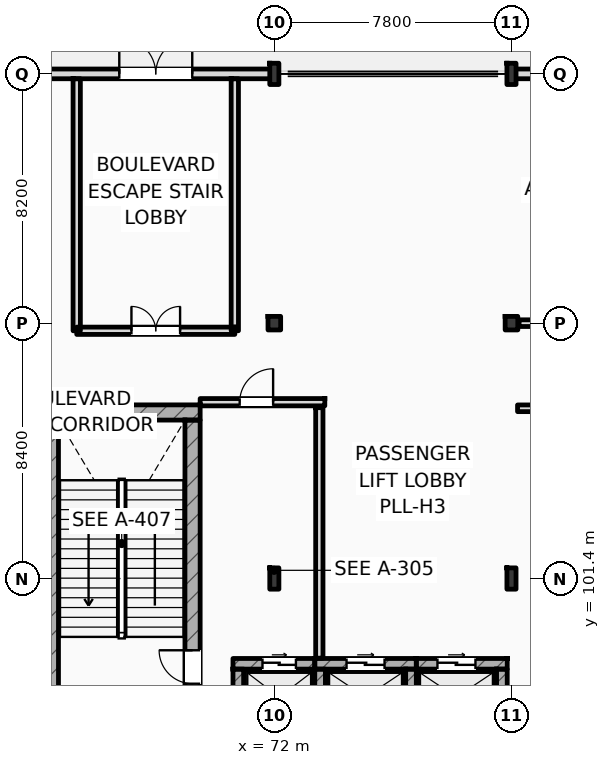
"""IFC4 building model, lengths in metres.
Left out: names, types, materials, properties, quantities, classifications, styles, units other than length and angle.
Written with IfcOpenShell. Run it as: python <this file> out.ifc"""

import sys

from ifc_helpers import new_model, si_unit, direction, frame, frame_2d, origin, origin_2d, place, context, subcontext, project, spatial, rectangle, i_section, extrude, element, fill, save


model = new_model("IFC4")
c1 = context("Model", 3, precision=1e-05, world=origin(), true_north=direction((0.0, 1.0)))
c2 = subcontext(c1, "Body", "Model", "MODEL_VIEW")
j1 = project(units=[si_unit("LENGTHUNIT", "METRE"), si_unit("PLANEANGLEUNIT", "RADIAN")], contexts=[c1])
p1 = place(None, origin())
s1 = spatial("IfcSite", under=j1, at=p1, CompositionType="ELEMENT")
p2 = place(p1, origin())
s2 = spatial("IfcBuilding", under=s1, at=p2, CompositionType="ELEMENT")
p3 = place(p2, origin())
s3 = spatial("IfcBuildingStorey", under=s2, at=p3, CompositionType="ELEMENT", Elevation=0.0)
p4 = place(p3, frame((72.0, 101.4, 0.0), z_axis=(0.0, 0.0, 1.0), x_axis=(1.0, 0.0, 0.0)))
e1 = element("IfcColumn", 1, at=p4, inside=s3, PredefinedType="COLUMN", context=c2, shape_type="SweptSolid", body=[
    extrude(i_section(OverallWidth=0.3, OverallDepth=0.7, WebThickness=0.017, FlangeThickness=0.032, FilletRadius=0.027, at=origin_2d()), origin(), (0.0, 0.0, 1.0), 6.0),
])
p5 = place(p3, frame((72.0, 109.8, 0.0), z_axis=(0.0, 0.0, 1.0), x_axis=(1.0, 0.0, 0.0)))
e2 = element("IfcColumn", 2, at=p5, inside=s3, PredefinedType="COLUMN", context=c2, shape_type="SweptSolid", body=[
    extrude(i_section(OverallWidth=0.416, OverallDepth=0.446, WebThickness=0.036, FlangeThickness=0.048, FilletRadius=0.015, at=origin_2d()), origin(), (0.0, 0.0, 1.0), 6.0),
])
for number, where, z_axis, x_axis in (
    (3, (72.0, 118.0, 0.0), (0.0, 0.0, 1.0), (1.0, 0.0, 0.0)),
    (4, (79.8, 101.4, 0.0), (0.0, 0.0, 1.0), (1.0, 0.0, 0.0)),
):
    element("IfcColumn", number, at=place(p3, frame(where, z_axis=z_axis, x_axis=x_axis)), inside=s3, PredefinedType="COLUMN", context=c2, shape_type="SweptSolid", body=[
        extrude(i_section(OverallWidth=0.3, OverallDepth=0.7, WebThickness=0.017, FlangeThickness=0.032, FilletRadius=0.027, at=origin_2d()), origin(), (0.0, 0.0, 1.0), 6.0),
    ])
p6 = place(p3, frame((79.8, 109.8, 0.0), z_axis=(0.0, 0.0, 1.0), x_axis=(1.0, 0.0, 0.0)))
e5 = element("IfcColumn", 5, at=p6, inside=s3, PredefinedType="COLUMN", context=c2, shape_type="SweptSolid", body=[
    extrude(i_section(OverallWidth=0.416, OverallDepth=0.446, WebThickness=0.036, FlangeThickness=0.048, FilletRadius=0.015, at=origin_2d()), origin(), (0.0, 0.0, 1.0), 6.0),
])
p7 = place(p3, frame((79.8, 118.0, 0.0), z_axis=(0.0, 0.0, 1.0), x_axis=(1.0, 0.0, 0.0)))
e6 = element("IfcColumn", 6, at=p7, inside=s3, PredefinedType="COLUMN", context=c2, shape_type="SweptSolid", body=[
    extrude(i_section(OverallWidth=0.3, OverallDepth=0.7, WebThickness=0.017, FlangeThickness=0.032, FilletRadius=0.027, at=origin_2d()), origin(), (0.0, 0.0, 1.0), 6.0),
])
p8 = place(p3, frame((64.4, 106.862, 0.0), z_axis=(0.0, 0.0, 1.0), x_axis=(1.0, 0.0, 0.0)))
e7 = element("IfcWall", 7, at=p8, inside=s3, PredefinedType="SHEAR", context=c2, shape_type="SweptSolid", body=[
    extrude(rectangle(XDim=5.16, YDim=0.5, at=frame_2d((2.58, 0.0))), origin(), (0.0, 0.0, 1.0), 6.0),
])
p9 = place(p3, frame((64.65, 97.5, 0.0), z_axis=(0.0, 0.0, 1.0), x_axis=(0.0, 1.0, 0.0)))
e8 = element("IfcWall", 8, at=p9, inside=s3, PredefinedType="SHEAR", context=c2, shape_type="SweptSolid", body=[
    extrude(rectangle(XDim=9.112, YDim=0.5, at=frame_2d((4.556, 0.0))), origin(), (0.0, 0.0, 1.0), 6.0),
])
p10 = place(p3, frame((69.31, 97.5, 0.0), z_axis=(0.0, 0.0, 1.0), x_axis=(0.0, 1.0, 0.0)))
e9 = element("IfcWall", 9, at=p10, inside=s3, PredefinedType="SHEAR", context=c2, shape_type="SweptSolid", body=[
    extrude(rectangle(XDim=9.112, YDim=0.5, at=frame_2d((4.556, 0.0))), origin(), (0.0, 0.0, 1.0), 6.0),
])
p11 = place(p10, frame((0.44, 0.0, 0.0)))
e10 = element("IfcOpeningElement", 10, at=p11, cuts=e9, PredefinedType="OPENING", context=c2, shape_type="SweptSolid", body=[
    extrude(rectangle(XDim=1.1, YDim=2.2, at=frame_2d((0.55, 1.1))), frame((0.0, 0.26, 0.0), z_axis=(0.0, -1.0, 0.0), x_axis=(1.0, 0.0, 0.0)), (0.0, 0.0, 1.0), 0.52),
])
p12 = place(p3, frame((64.2, 118.0, 0.0), z_axis=(0.0, 0.0, 1.0), x_axis=(1.0, 0.0, 0.0)))
e11 = element("IfcWall", 11, at=p12, inside=s3, PredefinedType="STANDARD", context=c2, shape_type="SweptSolid", body=[
    extrude(rectangle(XDim=7.8, YDim=0.32, at=frame_2d((3.9, 0.0))), origin(), (0.0, 0.0, 1.0), 5.19),
])
p13 = place(p12, frame((2.7, 0.0, 0.0)))
e12 = element("IfcOpeningElement", 12, at=p13, cuts=e11, PredefinedType="OPENING", context=c2, shape_type="SweptSolid", body=[
    extrude(rectangle(XDim=2.4, YDim=2.6, at=frame_2d((1.2, 1.3))), frame((0.0, 0.17, 0.0), z_axis=(0.0, -1.0, 0.0), x_axis=(1.0, 0.0, 0.0)), (0.0, 0.0, 1.0), 0.34),
])
p14 = place(p3, frame((79.8, 118.0, 0.0), z_axis=(0.0, 0.0, 1.0), x_axis=(1.0, 0.0, 0.0)))
e13 = element("IfcWall", 13, at=p14, inside=s3, PredefinedType="STANDARD", context=c2, shape_type="SweptSolid", body=[
    extrude(rectangle(XDim=7.8, YDim=0.32, at=frame_2d((3.9, 0.0))), origin(), (0.0, 0.0, 1.0), 5.19),
])
p15 = place(p14, frame((2.7, 0.0, 0.0)))
e14 = element("IfcOpeningElement", 14, at=p15, cuts=e13, PredefinedType="OPENING", context=c2, shape_type="SweptSolid", body=[
    extrude(rectangle(XDim=2.4, YDim=2.6, at=frame_2d((1.2, 1.3))), frame((0.0, 0.17, 0.0), z_axis=(0.0, -1.0, 0.0), x_axis=(1.0, 0.0, 0.0)), (0.0, 0.0, 1.0), 0.34),
])
p16 = place(p3, frame((70.64, 98.595, 0.0), z_axis=(0.0, 0.0, 1.0), x_axis=(1.0, 0.0, 0.0)))
e15 = element("IfcWall", 15, at=p16, inside=s3, PredefinedType="SHEAR", context=c2, shape_type="SweptSolid", body=[
    extrude(rectangle(XDim=2.69, YDim=0.35, at=frame_2d((1.345, 0.0))), origin(), (0.0, 0.0, 1.0), 5.7),
])
p17 = place(p16, frame((0.97, 0.0, 0.0)))
e16 = element("IfcOpeningElement", 16, at=p17, cuts=e15, PredefinedType="OPENING", context=c2, shape_type="SweptSolid", body=[
    extrude(rectangle(XDim=1.1, YDim=2.2, at=frame_2d((0.55, 1.1))), frame((0.0, 0.185, 0.0), z_axis=(0.0, -1.0, 0.0), x_axis=(1.0, 0.0, 0.0)), (0.0, 0.0, 1.0), 0.37),
])
p18 = place(p3, frame((70.815, 96.58, 0.0), z_axis=(0.0, 0.0, 1.0), x_axis=(0.0, 1.0, 0.0)))
e17 = element("IfcWall", 17, at=p18, inside=s3, PredefinedType="SHEAR", context=c2, shape_type="SweptSolid", body=[
    extrude(rectangle(XDim=1.84, YDim=0.35, at=frame_2d((0.92, 0.0))), origin(), (0.0, 0.0, 1.0), 5.7),
])
p19 = place(p3, frame((73.33, 98.595, 0.0), z_axis=(0.0, 0.0, 1.0), x_axis=(1.0, 0.0, 0.0)))
e18 = element("IfcWall", 18, at=p19, inside=s3, PredefinedType="SHEAR", context=c2, shape_type="SweptSolid", body=[
    extrude(rectangle(XDim=3.34, YDim=0.35, at=frame_2d((1.67, 0.0))), origin(), (0.0, 0.0, 1.0), 5.7),
])
p20 = place(p19, frame((1.045, 0.0, 0.0)))
e19 = element("IfcOpeningElement", 19, at=p20, cuts=e18, PredefinedType="OPENING", context=c2, shape_type="SweptSolid", body=[
    extrude(rectangle(XDim=1.25, YDim=2.25, at=frame_2d((0.625, 1.125))), frame((0.0, 0.185, 0.0), z_axis=(0.0, -1.0, 0.0), x_axis=(1.0, 0.0, 0.0)), (0.0, 0.0, 1.0), 0.37),
])
for number, where, z_axis, x_axis in (
    (20, (73.505, 96.58, 0.0), (0.0, 0.0, 1.0), (0.0, 1.0, 0.0)),
    (21, (76.495, 96.58, 0.0), (0.0, 0.0, 1.0), (0.0, 1.0, 0.0)),
):
    element("IfcWall", number, at=place(p3, frame(where, z_axis=z_axis, x_axis=x_axis)), inside=s3, PredefinedType="SHEAR", context=c2, shape_type="SweptSolid", body=[
        extrude(rectangle(XDim=1.84, YDim=0.35, at=frame_2d((0.92, 0.0))), origin(), (0.0, 0.0, 1.0), 5.7),
    ])
p21 = place(p3, frame((76.67, 98.595, 0.0), z_axis=(0.0, 0.0, 1.0), x_axis=(1.0, 0.0, 0.0)))
e22 = element("IfcWall", 22, at=p21, inside=s3, PredefinedType="SHEAR", context=c2, shape_type="SweptSolid", body=[
    extrude(rectangle(XDim=2.99, YDim=0.35, at=frame_2d((1.495, 0.0))), origin(), (0.0, 0.0, 1.0), 5.7),
])
p22 = place(p21, frame((0.695, 0.0, 0.0)))
e23 = element("IfcOpeningElement", 23, at=p22, cuts=e22, PredefinedType="OPENING", context=c2, shape_type="SweptSolid", body=[
    extrude(rectangle(XDim=1.25, YDim=2.25, at=frame_2d((0.625, 1.125))), frame((0.0, 0.185, 0.0), z_axis=(0.0, -1.0, 0.0), x_axis=(1.0, 0.0, 0.0)), (0.0, 0.0, 1.0), 0.37),
])
p23 = place(p3, frame((79.485, 96.58, 0.0), z_axis=(0.0, 0.0, 1.0), x_axis=(0.0, 1.0, 0.0)))
e24 = element("IfcWall", 24, at=p23, inside=s3, PredefinedType="SHEAR", context=c2, shape_type="SweptSolid", body=[
    extrude(rectangle(XDim=1.84, YDim=0.35, at=frame_2d((0.92, 0.0))), origin(), (0.0, 0.0, 1.0), 5.24),
])
p24 = place(p3, frame((73.48, 98.78, 0.0), z_axis=(0.0, 0.0, 1.0), x_axis=(0.0, 1.0, 0.0)))
e25 = element("IfcWall", 25, at=p24, inside=s3, PredefinedType="STANDARD", context=c2, shape_type="SweptSolid", body=[
    extrude(rectangle(XDim=8.24, YDim=0.24, at=frame_2d((4.12, 0.0))), origin(), (0.0, 0.0, 1.0), 5.7),
])
p25 = place(p3, frame((69.56, 107.2, 0.0), z_axis=(0.0, 0.0, 1.0), x_axis=(1.0, 0.0, 0.0)))
e26 = element("IfcWall", 26, at=p25, inside=s3, PredefinedType="STANDARD", context=c2, shape_type="SweptSolid", body=[
    extrude(rectangle(XDim=4.1, YDim=0.24, at=frame_2d((2.05, 0.0))), origin(), (0.0, 0.0, 1.0), 5.7),
])
p26 = place(p25, frame((1.3, 0.0, 0.0)))
e27 = element("IfcOpeningElement", 27, at=p26, cuts=e26, PredefinedType="OPENING", context=c2, shape_type="SweptSolid", body=[
    extrude(rectangle(XDim=1.1, YDim=2.2, at=frame_2d((0.55, 1.1))), frame((0.0, 0.13, 0.0), z_axis=(0.0, -1.0, 0.0), x_axis=(1.0, 0.0, 0.0)), (0.0, 0.0, 1.0), 0.26),
])
p27 = place(p3, frame((80.05, 109.8, 0.0), z_axis=(0.0, 0.0, 1.0), x_axis=(1.0, 0.0, 0.0)))
e28 = element("IfcWall", 28, at=p27, inside=s3, PredefinedType="PARTITIONING", context=c2, shape_type="SweptSolid", body=[
    extrude(rectangle(XDim=39.25, YDim=0.22, at=frame_2d((19.625, 0.0))), origin(), (0.0, 0.0, 1.0), 5.14),
])
p28 = place(p27, frame((18.625, 0.0, 0.0)))
e29 = element("IfcOpeningElement", 29, at=p28, cuts=e28, PredefinedType="OPENING", context=c2, shape_type="SweptSolid", body=[
    extrude(rectangle(XDim=2.0, YDim=2.35, at=frame_2d((1.0, 1.175))), frame((0.0, 0.12, 0.0), z_axis=(0.0, -1.0, 0.0), x_axis=(1.0, 0.0, 0.0)), (0.0, 0.0, 1.0), 0.24),
])
p29 = place(p3, frame((80.0, 107.0, 0.0), z_axis=(0.0, 0.0, 1.0), x_axis=(1.0, 0.0, 0.0)))
e30 = element("IfcWall", 30, at=p29, inside=s3, PredefinedType="PARTITIONING", context=c2, shape_type="SweptSolid", body=[
    extrude(rectangle(XDim=39.35, YDim=0.22, at=frame_2d((19.675, 0.0))), origin(), (0.0, 0.0, 1.0), 5.7),
])
p30 = place(p29, frame((18.675, 0.0, 0.0)))
e31 = element("IfcOpeningElement", 31, at=p30, cuts=e30, PredefinedType="OPENING", context=c2, shape_type="SweptSolid", body=[
    extrude(rectangle(XDim=2.0, YDim=2.35, at=frame_2d((1.0, 1.175))), frame((0.0, 0.12, 0.0), z_axis=(0.0, -1.0, 0.0), x_axis=(1.0, 0.0, 0.0)), (0.0, 0.0, 1.0), 0.24),
])
for number, where, z_axis, x_axis in (
    (32, (65.5, 109.55, 0.0), (0.0, 0.0, 1.0), (0.0, 1.0, 0.0)),
    (33, (70.7, 109.55, 0.0), (0.0, 0.0, 1.0), (0.0, 1.0, 0.0)),
):
    element("IfcWall", number, at=place(p3, frame(where, z_axis=z_axis, x_axis=x_axis)), inside=s3, PredefinedType="STANDARD", context=c2, shape_type="SweptSolid", body=[
        extrude(rectangle(XDim=8.29, YDim=0.24, at=frame_2d((4.145, 0.0))), origin(), (0.0, 0.0, 1.0), 5.7),
    ])
p31 = place(p3, frame((65.5, 109.55, 0.0), z_axis=(0.0, 0.0, 1.0), x_axis=(1.0, 0.0, 0.0)))
e34 = element("IfcWall", 34, at=p31, inside=s3, PredefinedType="STANDARD", context=c2, shape_type="SweptSolid", body=[
    extrude(rectangle(XDim=5.2, YDim=0.24, at=frame_2d((2.6, 0.0))), origin(), (0.0, 0.0, 1.0), 5.19),
])
p32 = place(p31, frame((1.8, 0.0, 0.0)))
e35 = element("IfcOpeningElement", 35, at=p32, cuts=e34, PredefinedType="OPENING", context=c2, shape_type="SweptSolid", body=[
    extrude(rectangle(XDim=1.6, YDim=2.2, at=frame_2d((0.8, 1.1))), frame((0.0, 0.13, 0.0), z_axis=(0.0, -1.0, 0.0), x_axis=(1.0, 0.0, 0.0)), (0.0, 0.0, 1.0), 0.26),
])
p33 = place(p13, origin())
e36 = element("IfcDoor", 36, at=p33, inside=s3, OperationType="DOUBLE_SWING_LEFT", PredefinedType="DOOR", context=c2, shape_type="SweptSolid", body=[
    extrude(rectangle(XDim=2.4, YDim=2.6, at=frame_2d((1.2, 1.3))), frame((0.0, 0.025, 0.0), z_axis=(0.0, -1.0, 0.0), x_axis=(1.0, 0.0, 0.0)), (0.0, 0.0, 1.0), 0.05),
])
fill(e12, e36)
p34 = place(p11, origin())
e37 = element("IfcDoor", 37, at=p34, inside=s3, OperationType="SINGLE_SWING_RIGHT", PredefinedType="DOOR", context=c2, shape_type="SweptSolid", body=[
    extrude(rectangle(XDim=1.1, YDim=2.2, at=frame_2d((0.55, 1.1))), frame((0.0, 0.025, 0.0), z_axis=(0.0, -1.0, 0.0), x_axis=(1.0, 0.0, 0.0)), (0.0, 0.0, 1.0), 0.05),
])
fill(e10, e37)
p35 = place(p17, origin())
e38 = element("IfcDoor", 38, at=p35, inside=s3, OperationType="SLIDING_TO_LEFT", PredefinedType="DOOR", context=c2, shape_type="SweptSolid", body=[
    extrude(rectangle(XDim=1.1, YDim=2.2, at=frame_2d((0.55, 1.1))), frame((0.0, 0.025, 0.0), z_axis=(0.0, -1.0, 0.0), x_axis=(1.0, 0.0, 0.0)), (0.0, 0.0, 1.0), 0.05),
])
fill(e16, e38)
p36 = place(p20, origin())
e39 = element("IfcDoor", 39, at=p36, inside=s3, OperationType="SLIDING_TO_LEFT", PredefinedType="DOOR", context=c2, shape_type="SweptSolid", body=[
    extrude(rectangle(XDim=1.25, YDim=2.25, at=frame_2d((0.625, 1.125))), frame((0.0, 0.025, 0.0), z_axis=(0.0, -1.0, 0.0), x_axis=(1.0, 0.0, 0.0)), (0.0, 0.0, 1.0), 0.05),
])
fill(e19, e39)
p37 = place(p22, origin())
e40 = element("IfcDoor", 40, at=p37, inside=s3, OperationType="SLIDING_TO_LEFT", PredefinedType="DOOR", context=c2, shape_type="SweptSolid", body=[
    extrude(rectangle(XDim=1.25, YDim=2.25, at=frame_2d((0.625, 1.125))), frame((0.0, 0.025, 0.0), z_axis=(0.0, -1.0, 0.0), x_axis=(1.0, 0.0, 0.0)), (0.0, 0.0, 1.0), 0.05),
])
fill(e23, e40)
p38 = place(p26, origin())
e41 = element("IfcDoor", 41, at=p38, inside=s3, OperationType="SINGLE_SWING_RIGHT", PredefinedType="DOOR", context=c2, shape_type="SweptSolid", body=[
    extrude(rectangle(XDim=1.1, YDim=2.2, at=frame_2d((0.55, 1.1))), frame((0.0, 0.025, 0.0), z_axis=(0.0, -1.0, 0.0), x_axis=(1.0, 0.0, 0.0)), (0.0, 0.0, 1.0), 0.05),
])
fill(e27, e41)
p39 = place(p32, origin())
e42 = element("IfcDoor", 42, at=p39, inside=s3, OperationType="DOUBLE_SWING_LEFT", PredefinedType="DOOR", context=c2, shape_type="SweptSolid", body=[
    extrude(rectangle(XDim=1.6, YDim=2.2, at=frame_2d((0.8, 1.1))), frame((0.0, 0.025, 0.0), z_axis=(0.0, -1.0, 0.0), x_axis=(1.0, 0.0, 0.0)), (0.0, 0.0, 1.0), 0.05),
])
fill(e35, e42)
save(model, sys.argv[1])
